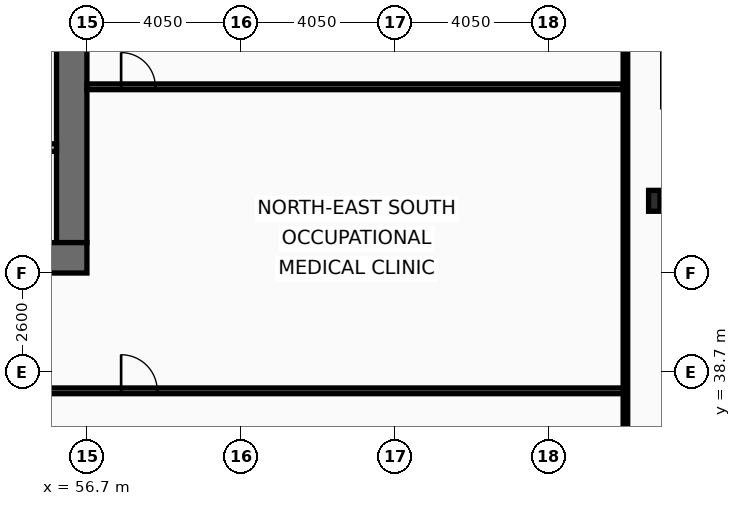
"""IFC4 building model, lengths in metres.
Left out: names, types, materials, properties, quantities, classifications, styles, units other than length and angle.
Written with IfcOpenShell. Run it as: python <this file> out.ifc"""

import sys

from ifc_helpers import new_model, si_unit, direction, frame, frame_2d, origin, origin_2d, place, context, subcontext, project, spatial, rectangle, i_section, extrude, element, fill, save


model = new_model("IFC4")
c1 = context("Model", 3, precision=1e-05, world=origin(), true_north=direction((0.0, 1.0)))
c2 = subcontext(c1, "Body", "Model", "MODEL_VIEW")
j1 = project(units=[si_unit("LENGTHUNIT", "METRE"), si_unit("PLANEANGLEUNIT", "RADIAN")], contexts=[c1])
p1 = place(None, origin())
s1 = spatial("IfcSite", under=j1, at=p1, CompositionType="ELEMENT")
p2 = place(p1, origin())
s2 = spatial("IfcBuilding", under=s1, at=p2, CompositionType="ELEMENT")
p3 = place(p2, frame((0.0, 0.0, 69.8)))
s3 = spatial("IfcBuildingStorey", under=s2, at=p3, CompositionType="ELEMENT", Elevation=69.8)
p4 = place(p3, frame((56.3, 52.9, 0.0), z_axis=(0.0, 0.0, 1.0), x_axis=(0.0, -1.0, 0.0)))
e1 = element("IfcWall", 1, at=p4, inside=s3, PredefinedType="SHEAR", context=c2, shape_type="SweptSolid", body=[
    extrude(rectangle(XDim=10.8, YDim=0.8, at=frame_2d((5.4, 0.0))), origin(), (0.0, 0.0, 1.0), 3.82),
])
p5 = place(p3, frame((56.7, 41.7, 0.0), z_axis=(0.0, 0.0, 1.0), x_axis=(-1.0, 0.0, 0.0)))
e2 = element("IfcWall", 2, at=p5, inside=s3, PredefinedType="SHEAR", context=c2, shape_type="SweptSolid", body=[
    extrude(rectangle(XDim=2.45, YDim=0.8, at=frame_2d((1.225, 0.0))), origin(), (0.0, 0.0, 1.0), 3.82),
])
p6 = place(p3, frame((71.63, 43.2, 0.0), z_axis=(0.0, 0.0, 1.0), x_axis=(1.0, 0.0, 0.0)))
e3 = element("IfcColumn", 3, at=p6, inside=s3, PredefinedType="COLUMN", context=c2, shape_type="SweptSolid", body=[
    extrude(i_section(OverallWidth=0.3, OverallDepth=0.55, WebThickness=0.015, FlangeThickness=0.029, at=origin_2d()), origin(), (0.0, 0.0, 1.0), 4.0),
])
p7 = place(p3, frame((51.9, 44.6, 0.0), z_axis=(0.0, 0.0, 1.0), x_axis=(1.0, 0.0, 0.0)))
e4 = element("IfcWall", 4, at=p7, inside=s3, PredefinedType="PARTITIONING", context=c2, shape_type="SweptSolid", body=[
    extrude(rectangle(XDim=4.0, YDim=0.2, at=frame_2d((2.0, 0.0))), origin(), (0.0, 0.0, 1.0), 3.82),
])
p8 = place(p7, frame((1.15, 0.0, 0.0)))
e5 = element("IfcOpeningElement", 5, at=p8, cuts=e4, PredefinedType="OPENING", context=c2, shape_type="SweptSolid", body=[
    extrude(rectangle(XDim=1.05, YDim=2.15, at=frame_2d((0.525, 1.075))), frame((0.0, 0.11, 0.0), z_axis=(0.0, -1.0, 0.0), x_axis=(1.0, 0.0, 0.0)), (0.0, 0.0, 1.0), 0.22),
])
p9 = place(p3, frame((54.35, 38.2, 0.0), z_axis=(0.0, 0.0, 1.0), x_axis=(1.0, 0.0, 0.0)))
e6 = element("IfcWall", 6, at=p9, inside=s3, PredefinedType="PARTITIONING", context=c2, shape_type="SweptSolid", body=[
    extrude(rectangle(XDim=16.52, YDim=0.15, at=frame_2d((8.26, 0.0))), origin(), (0.0, 0.0, 1.0), 3.01),
])
p10 = place(p9, frame((3.25, 0.0, 0.0)))
e7 = element("IfcOpeningElement", 7, at=p10, cuts=e6, PredefinedType="OPENING", context=c2, shape_type="SweptSolid", body=[
    extrude(rectangle(XDim=0.95, YDim=2.05, at=frame_2d((0.475, 1.025))), frame((0.0, 0.085, 0.0), z_axis=(0.0, -1.0, 0.0), x_axis=(1.0, 0.0, 0.0)), (0.0, 0.0, 1.0), 0.17),
])
p11 = place(p3, frame((56.7, 46.2, 0.0), z_axis=(0.0, 0.0, 1.0), x_axis=(1.0, 0.0, 0.0)))
e8 = element("IfcWall", 8, at=p11, inside=s3, PredefinedType="PARTITIONING", context=c2, shape_type="SweptSolid", body=[
    extrude(rectangle(XDim=14.105, YDim=0.15, at=frame_2d((7.052, 0.0))), origin(), (0.0, 0.0, 1.0), 3.16),
])
p12 = place(p11, frame((0.9, 0.0, 0.0)))
e9 = element("IfcOpeningElement", 9, at=p12, cuts=e8, PredefinedType="OPENING", context=c2, shape_type="SweptSolid", body=[
    extrude(rectangle(XDim=0.9, YDim=2.05, at=frame_2d((0.45, 1.025))), frame((0.0, 0.085, 0.0), z_axis=(0.0, -1.0, 0.0), x_axis=(1.0, 0.0, 0.0)), (0.0, 0.0, 1.0), 0.17),
])
p13 = place(p3, frame((70.87, 10.665, 0.0), z_axis=(0.0, 0.0, 1.0), x_axis=(0.0, 1.0, 0.0)))
e10 = element("IfcWall", 10, at=p13, inside=s3, PredefinedType="PARTITIONING", context=c2, shape_type="SweptSolid", body=[
    extrude(rectangle(XDim=42.11, YDim=0.12, at=frame_2d((21.055, 0.0))), origin(), (0.0, 0.0, 1.0), 3.01),
])
p14 = place(p10, origin())
e11 = element("IfcDoor", 11, at=p14, inside=s3, OperationType="SINGLE_SWING_LEFT", PredefinedType="DOOR", context=c2, shape_type="SweptSolid", body=[
    extrude(rectangle(XDim=0.95, YDim=2.05, at=frame_2d((0.475, 1.025))), frame((0.0, 0.025, 0.0), z_axis=(0.0, -1.0, 0.0), x_axis=(1.0, 0.0, 0.0)), (0.0, 0.0, 1.0), 0.05),
])
fill(e7, e11)
p15 = place(p12, origin())
e12 = element("IfcDoor", 12, at=p15, inside=s3, OperationType="SINGLE_SWING_LEFT", PredefinedType="DOOR", context=c2, shape_type="SweptSolid", body=[
    extrude(rectangle(XDim=0.9, YDim=2.05, at=frame_2d((0.45, 1.025))), frame((0.0, 0.025, 0.0), z_axis=(0.0, -1.0, 0.0), x_axis=(1.0, 0.0, 0.0)), (0.0, 0.0, 1.0), 0.05),
])
fill(e9, e12)
save(model, sys.argv[1])
